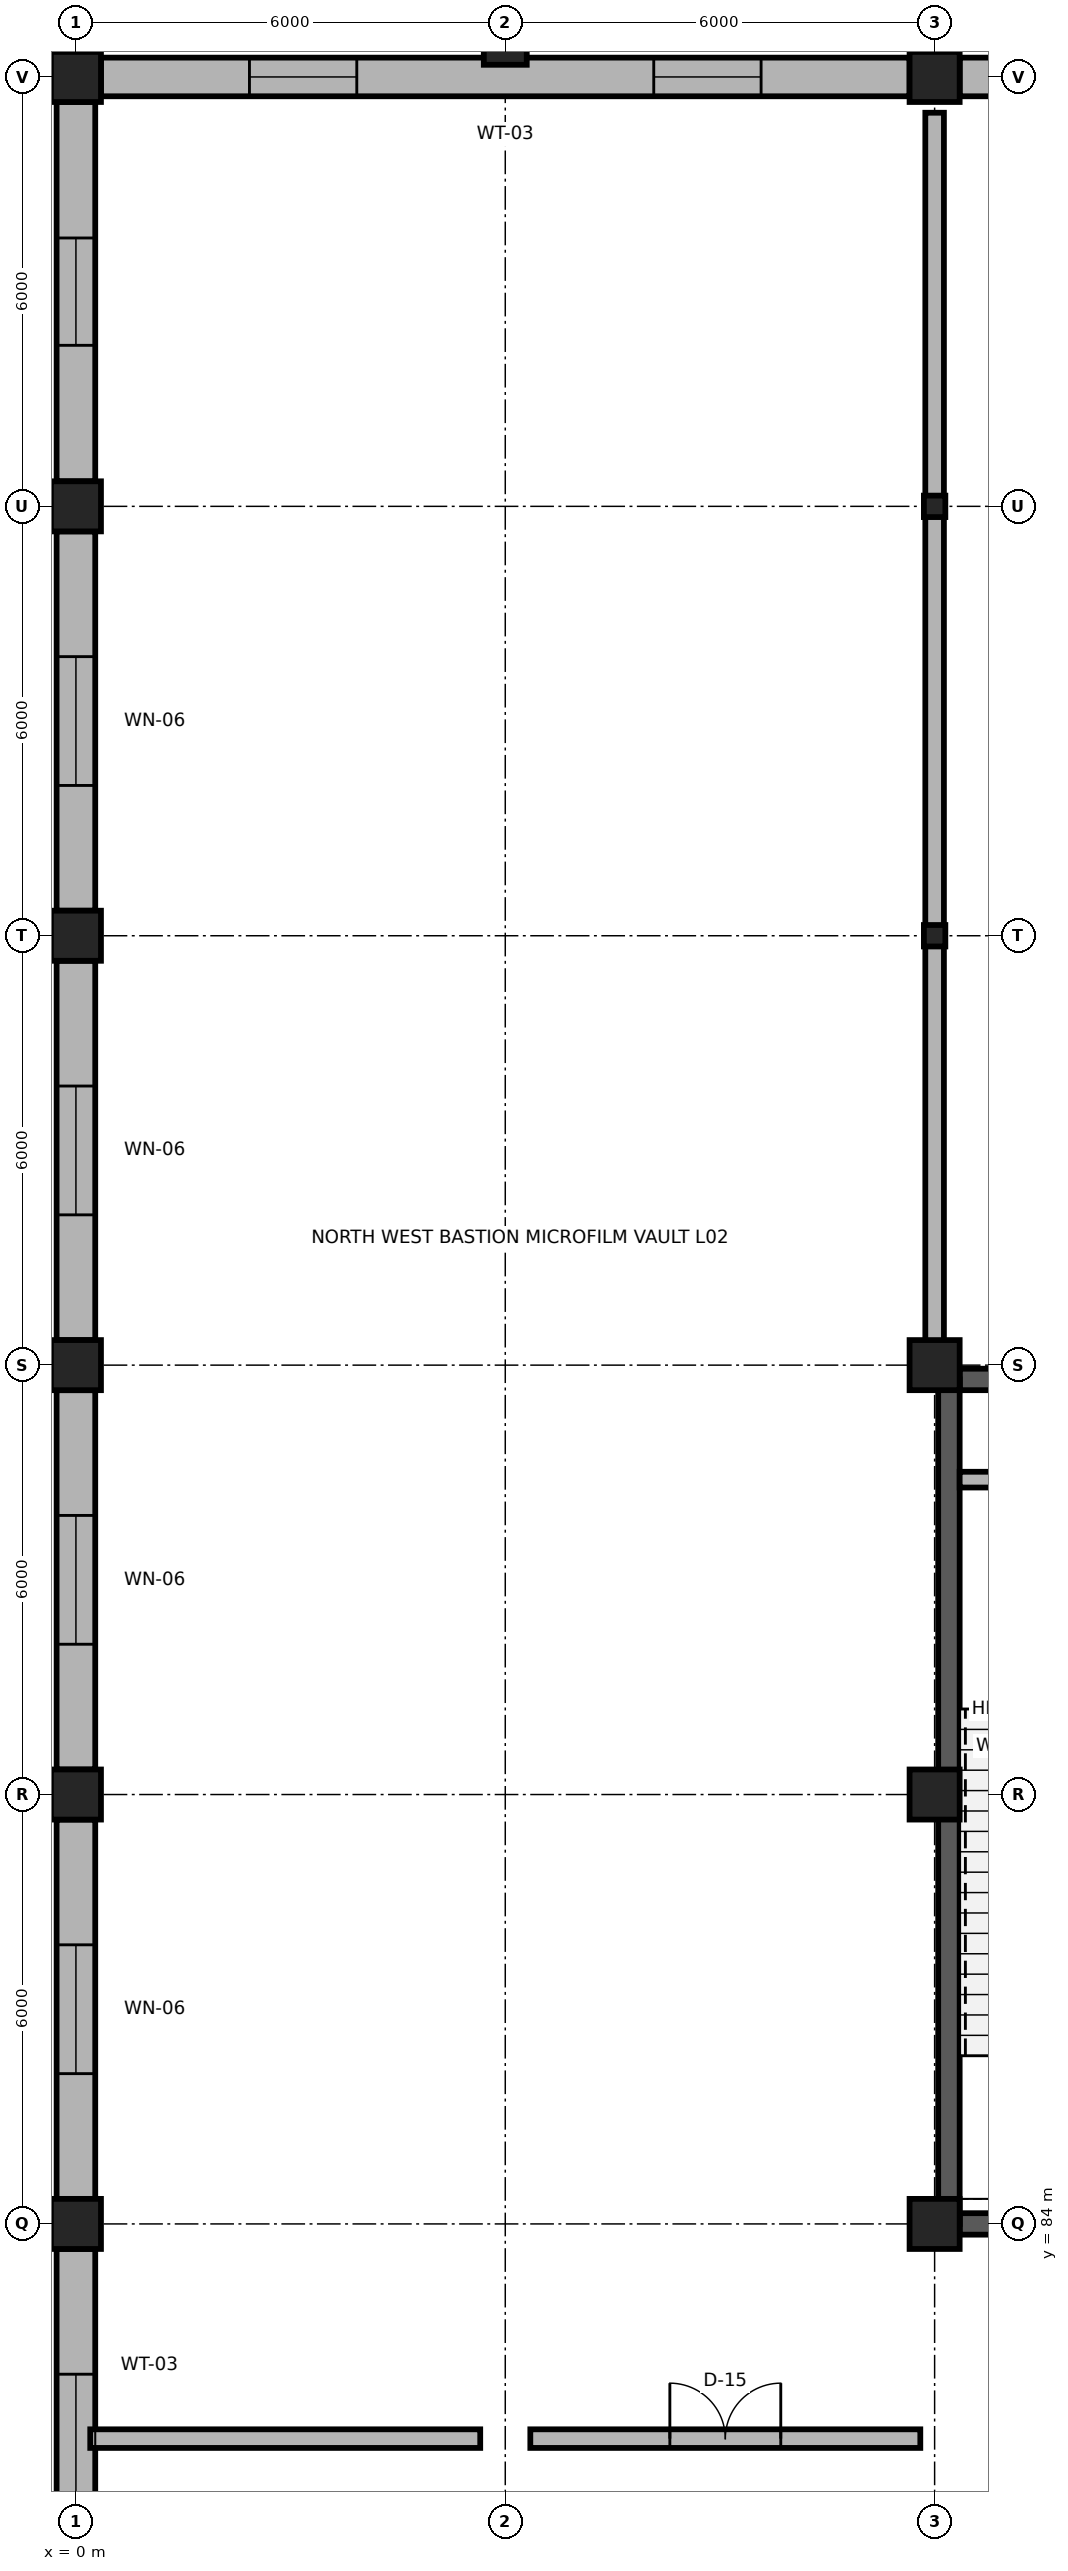
"""IFC4 building model, lengths in metres.
Left out: names, types, materials, properties, quantities, classifications, styles, units other than length and angle.
Written with IfcOpenShell. Run it as: python <this file> out.ifc"""

import sys

from ifc_helpers import new_model, si_unit, direction, frame, frame_2d, origin, origin_2d, place, context, subcontext, project, spatial, rectangle, i_section, extrude, element, fill, save


model = new_model("IFC4")
c1 = context("Model", 3, precision=1e-05, world=origin(), true_north=direction((0.0, 1.0)))
c2 = subcontext(c1, "Body", "Model", "MODEL_VIEW")
j1 = project(units=[si_unit("LENGTHUNIT", "METRE"), si_unit("PLANEANGLEUNIT", "RADIAN")], contexts=[c1])
p1 = place(None, origin())
s1 = spatial("IfcSite", under=j1, at=p1, CompositionType="ELEMENT")
p2 = place(p1, origin())
s2 = spatial("IfcBuilding", under=s1, at=p2, CompositionType="ELEMENT")
p3 = place(p2, frame((0.0, 0.0, 6.0)))
s3 = spatial("IfcBuildingStorey", under=s2, at=p3, CompositionType="ELEMENT", Elevation=6.0)
for number, where, z_axis, x_axis in (
    (1, (0.0, 84.0, 0.0), (0.0, 0.0, 1.0), (1.0, 0.0, 0.0)),
    (2, (12.0, 84.0, 0.0), (0.0, 0.0, 1.0), (1.0, 0.0, 0.0)),
    (3, (0.0, 90.0, 0.0), (0.0, 0.0, 1.0), (1.0, 0.0, 0.0)),
    (4, (12.0, 90.0, 0.0), (0.0, 0.0, 1.0), (1.0, 0.0, 0.0)),
    (5, (0.0, 96.0, 0.0), (0.0, 0.0, 1.0), (1.0, 0.0, 0.0)),
    (6, (12.0, 96.0, 0.0), (0.0, 0.0, 1.0), (1.0, 0.0, 0.0)),
    (7, (0.0, 102.0, 0.0), (0.0, 0.0, 1.0), (1.0, 0.0, 0.0)),
):
    element("IfcColumn", number, at=place(p3, frame(where, z_axis=z_axis, x_axis=x_axis)), inside=s3, PredefinedType="COLUMN", context=c2, shape_type="SweptSolid", body=[
        extrude(rectangle(XDim=0.7, YDim=0.7, at=origin_2d()), origin(), (0.0, 0.0, 1.0), 6.0),
    ])
p4 = place(p3, frame((12.0, 102.0, 0.0), z_axis=(0.0, 0.0, 1.0), x_axis=(1.0, 0.0, 0.0)))
e8 = element("IfcColumn", 8, at=p4, inside=s3, PredefinedType="COLUMN", context=c2, shape_type="SweptSolid", body=[
    extrude(i_section(OverallWidth=0.3, OverallDepth=0.3, WebThickness=0.01, FlangeThickness=0.015, FilletRadius=0.018, at=origin_2d()), origin(), (0.0, 0.0, 1.0), 6.0),
])
p5 = place(p3, frame((0.0, 108.0, 0.0), z_axis=(0.0, 0.0, 1.0), x_axis=(1.0, 0.0, 0.0)))
e9 = element("IfcColumn", 9, at=p5, inside=s3, PredefinedType="COLUMN", context=c2, shape_type="SweptSolid", body=[
    extrude(rectangle(XDim=0.7, YDim=0.7, at=origin_2d()), origin(), (0.0, 0.0, 1.0), 6.0),
])
p6 = place(p3, frame((12.0, 108.0, 0.0), z_axis=(0.0, 0.0, 1.0), x_axis=(1.0, 0.0, 0.0)))
e10 = element("IfcColumn", 10, at=p6, inside=s3, PredefinedType="COLUMN", context=c2, shape_type="SweptSolid", body=[
    extrude(i_section(OverallWidth=0.3, OverallDepth=0.3, WebThickness=0.01, FlangeThickness=0.015, FilletRadius=0.018, at=origin_2d()), origin(), (0.0, 0.0, 1.0), 6.0),
])
for number, where, z_axis, x_axis in (
    (11, (0.0, 114.0, 0.0), (0.0, 0.0, 1.0), (1.0, 0.0, 0.0)),
    (12, (12.0, 114.0, 0.0), (0.0, 0.0, 1.0), (1.0, 0.0, 0.0)),
):
    element("IfcColumn", number, at=place(p3, frame(where, z_axis=z_axis, x_axis=x_axis)), inside=s3, PredefinedType="COLUMN", context=c2, shape_type="SweptSolid", body=[
        extrude(rectangle(XDim=0.7, YDim=0.7, at=origin_2d()), origin(), (0.0, 0.0, 1.0), 6.0),
    ])
p7 = place(p3, frame((6.0, 114.35, 0.0), z_axis=(0.0, 0.0, 1.0), x_axis=(1.0, 0.0, 0.0)))
e13 = element("IfcColumn", 13, at=p7, inside=s3, PredefinedType="PILASTER", context=c2, shape_type="SweptSolid", body=[
    extrude(rectangle(XDim=0.6, YDim=0.36, at=origin_2d()), origin(), (0.0, 0.0, 1.0), 6.0),
])
p8 = place(p3, frame((0.35, 114.0, 0.0), z_axis=(0.0, 0.0, 1.0), x_axis=(1.0, 0.0, 0.0)))
e14 = element("IfcWall", 14, at=p8, inside=s3, PredefinedType="SOLIDWALL", context=c2, shape_type="SweptSolid", body=[
    extrude(rectangle(XDim=11.3, YDim=0.54, at=frame_2d((5.65, 0.0))), origin(), (0.0, 0.0, 1.0), 5.31),
])
p9 = place(p8, frame((2.075, 0.0, 0.85)))
e15 = element("IfcOpeningElement", 15, at=p9, cuts=e14, PredefinedType="OPENING", context=c2, shape_type="SweptSolid", body=[
    extrude(rectangle(XDim=1.5, YDim=2.8, at=frame_2d((0.75, 1.4))), frame((0.0, 0.285, 0.0), z_axis=(0.0, -1.0, 0.0), x_axis=(1.0, 0.0, 0.0)), (0.0, 0.0, 1.0), 0.57),
])
p10 = place(p8, frame((7.725, 0.0, 0.85)))
e16 = element("IfcOpeningElement", 16, at=p10, cuts=e14, PredefinedType="OPENING", context=c2, shape_type="SweptSolid", body=[
    extrude(rectangle(XDim=1.5, YDim=2.8, at=frame_2d((0.75, 1.4))), frame((0.0, 0.285, 0.0), z_axis=(0.0, -1.0, 0.0), x_axis=(1.0, 0.0, 0.0)), (0.0, 0.0, 1.0), 0.57),
])
p11 = place(p3, frame((12.35, 114.0, 0.0), z_axis=(0.0, 0.0, 1.0), x_axis=(1.0, 0.0, 0.0)))
e17 = element("IfcWall", 17, at=p11, inside=s3, PredefinedType="SOLIDWALL", context=c2, shape_type="SweptSolid", body=[
    extrude(rectangle(XDim=5.3, YDim=0.54, at=frame_2d((2.65, 0.0))), origin(), (0.0, 0.0, 1.0), 5.31),
])
p12 = place(p3, frame((0.0, 78.35, 0.0), z_axis=(0.0, 0.0, 1.0), x_axis=(0.0, 1.0, 0.0)))
e18 = element("IfcWall", 18, at=p12, inside=s3, PredefinedType="SOLIDWALL", context=c2, shape_type="SweptSolid", body=[
    extrude(rectangle(XDim=5.3, YDim=0.54, at=frame_2d((2.65, 0.0))), origin(), (0.0, 0.0, 1.0), 5.31),
])
p13 = place(p12, frame((1.75, 0.0, 0.85)))
e19 = element("IfcOpeningElement", 19, at=p13, cuts=e18, PredefinedType="OPENING", context=c2, shape_type="SweptSolid", body=[
    extrude(rectangle(XDim=1.8, YDim=3.3, at=frame_2d((0.9, 1.65))), frame((0.0, 0.285, 0.0), z_axis=(0.0, -1.0, 0.0), x_axis=(1.0, 0.0, 0.0)), (0.0, 0.0, 1.0), 0.57),
])
p14 = place(p3, frame((0.0, 84.35, 0.0), z_axis=(0.0, 0.0, 1.0), x_axis=(0.0, 1.0, 0.0)))
e20 = element("IfcWall", 20, at=p14, inside=s3, PredefinedType="SOLIDWALL", context=c2, shape_type="SweptSolid", body=[
    extrude(rectangle(XDim=5.3, YDim=0.54, at=frame_2d((2.65, 0.0))), origin(), (0.0, 0.0, 1.0), 5.31),
])
p15 = place(p14, frame((1.75, 0.0, 0.85)))
e21 = element("IfcOpeningElement", 21, at=p15, cuts=e20, PredefinedType="OPENING", context=c2, shape_type="SweptSolid", body=[
    extrude(rectangle(XDim=1.8, YDim=3.3, at=frame_2d((0.9, 1.65))), frame((0.0, 0.285, 0.0), z_axis=(0.0, -1.0, 0.0), x_axis=(1.0, 0.0, 0.0)), (0.0, 0.0, 1.0), 0.57),
])
p16 = place(p3, frame((0.0, 90.35, 0.0), z_axis=(0.0, 0.0, 1.0), x_axis=(0.0, 1.0, 0.0)))
e22 = element("IfcWall", 22, at=p16, inside=s3, PredefinedType="SOLIDWALL", context=c2, shape_type="SweptSolid", body=[
    extrude(rectangle(XDim=5.3, YDim=0.54, at=frame_2d((2.65, 0.0))), origin(), (0.0, 0.0, 1.0), 5.31),
])
p17 = place(p16, frame((1.75, 0.0, 0.85)))
e23 = element("IfcOpeningElement", 23, at=p17, cuts=e22, PredefinedType="OPENING", context=c2, shape_type="SweptSolid", body=[
    extrude(rectangle(XDim=1.8, YDim=3.3, at=frame_2d((0.9, 1.65))), frame((0.0, 0.285, 0.0), z_axis=(0.0, -1.0, 0.0), x_axis=(1.0, 0.0, 0.0)), (0.0, 0.0, 1.0), 0.57),
])
p18 = place(p3, frame((0.0, 96.35, 0.0), z_axis=(0.0, 0.0, 1.0), x_axis=(0.0, 1.0, 0.0)))
e24 = element("IfcWall", 24, at=p18, inside=s3, PredefinedType="SOLIDWALL", context=c2, shape_type="SweptSolid", body=[
    extrude(rectangle(XDim=5.3, YDim=0.54, at=frame_2d((2.65, 0.0))), origin(), (0.0, 0.0, 1.0), 5.31),
])
p19 = place(p18, frame((1.75, 0.0, 0.85)))
e25 = element("IfcOpeningElement", 25, at=p19, cuts=e24, PredefinedType="OPENING", context=c2, shape_type="SweptSolid", body=[
    extrude(rectangle(XDim=1.8, YDim=3.3, at=frame_2d((0.9, 1.65))), frame((0.0, 0.285, 0.0), z_axis=(0.0, -1.0, 0.0), x_axis=(1.0, 0.0, 0.0)), (0.0, 0.0, 1.0), 0.57),
])
p20 = place(p3, frame((0.0, 102.35, 0.0), z_axis=(0.0, 0.0, 1.0), x_axis=(0.0, 1.0, 0.0)))
e26 = element("IfcWall", 26, at=p20, inside=s3, PredefinedType="SOLIDWALL", context=c2, shape_type="SweptSolid", body=[
    extrude(rectangle(XDim=5.3, YDim=0.54, at=frame_2d((2.65, 0.0))), origin(), (0.0, 0.0, 1.0), 5.31),
])
p21 = place(p20, frame((1.75, 0.0, 0.85)))
e27 = element("IfcOpeningElement", 27, at=p21, cuts=e26, PredefinedType="OPENING", context=c2, shape_type="SweptSolid", body=[
    extrude(rectangle(XDim=1.8, YDim=3.3, at=frame_2d((0.9, 1.65))), frame((0.0, 0.285, 0.0), z_axis=(0.0, -1.0, 0.0), x_axis=(1.0, 0.0, 0.0)), (0.0, 0.0, 1.0), 0.57),
])
p22 = place(p3, frame((0.0, 108.35, 0.0), z_axis=(0.0, 0.0, 1.0), x_axis=(0.0, 1.0, 0.0)))
e28 = element("IfcWall", 28, at=p22, inside=s3, PredefinedType="SOLIDWALL", context=c2, shape_type="SweptSolid", body=[
    extrude(rectangle(XDim=5.3, YDim=0.54, at=frame_2d((2.65, 0.0))), origin(), (0.0, 0.0, 1.0), 5.31),
])
p23 = place(p22, frame((1.9, 0.0, 0.85)))
e29 = element("IfcOpeningElement", 29, at=p23, cuts=e28, PredefinedType="OPENING", context=c2, shape_type="SweptSolid", body=[
    extrude(rectangle(XDim=1.5, YDim=2.8, at=frame_2d((0.75, 1.4))), frame((0.0, 0.285, 0.0), z_axis=(0.0, -1.0, 0.0), x_axis=(1.0, 0.0, 0.0)), (0.0, 0.0, 1.0), 0.57),
])
p24 = place(p3, frame((12.35, 84.0, 0.0), z_axis=(0.0, 0.0, 1.0), x_axis=(1.0, 0.0, 0.0)))
e30 = element("IfcWall", 30, at=p24, inside=s3, PredefinedType="SHEAR", context=c2, shape_type="SweptSolid", body=[
    extrude(rectangle(XDim=5.3, YDim=0.3, at=frame_2d((2.65, 0.0))), origin(), (0.0, 0.0, 1.0), 5.76),
])
p25 = place(p24, frame((1.925, 0.0, 0.0)))
e31 = element("IfcOpeningElement", 31, at=p25, cuts=e30, PredefinedType="OPENING", context=c2, shape_type="SweptSolid", body=[
    extrude(rectangle(XDim=1.45, YDim=2.25, at=frame_2d((0.725, 1.125))), frame((0.0, 0.165, 0.0), z_axis=(0.0, -1.0, 0.0), x_axis=(1.0, 0.0, 0.0)), (0.0, 0.0, 1.0), 0.33),
])
p26 = place(p3, frame((12.35, 95.8, 0.0), z_axis=(0.0, 0.0, 1.0), x_axis=(1.0, 0.0, 0.0)))
e32 = element("IfcWall", 32, at=p26, inside=s3, PredefinedType="SHEAR", context=c2, shape_type="SweptSolid", body=[
    extrude(rectangle(XDim=5.3, YDim=0.3, at=frame_2d((2.65, 0.0))), origin(), (0.0, 0.0, 1.0), 5.76),
])
p27 = place(p3, frame((12.2, 84.0, 0.0), z_axis=(0.0, 0.0, 1.0), x_axis=(0.0, 1.0, 0.0)))
e33 = element("IfcWall", 33, at=p27, inside=s3, PredefinedType="SHEAR", context=c2, shape_type="SweptSolid", body=[
    extrude(rectangle(XDim=11.8, YDim=0.3, at=frame_2d((5.9, 0.0))), origin(), (0.0, 0.0, 1.0), 5.76),
])
p28 = place(p3, frame((12.35, 94.4, 0.0), z_axis=(0.0, 0.0, 1.0), x_axis=(1.0, 0.0, 0.0)))
e34 = element("IfcWall", 34, at=p28, inside=s3, PredefinedType="PARTITIONING", context=c2, shape_type="SweptSolid", body=[
    extrude(rectangle(XDim=1.1, YDim=0.22, at=frame_2d((0.55, 0.0))), origin(), (0.0, 0.0, 1.0), 5.76),
])
p29 = place(p3, frame((6.35, 81.0, 0.0), z_axis=(0.0, 0.0, 1.0), x_axis=(1.0, 0.0, 0.0)))
e35 = element("IfcWall", 35, at=p29, inside=s3, PredefinedType="PARTITIONING", context=c2, shape_type="SweptSolid", body=[
    extrude(rectangle(XDim=5.45, YDim=0.26, at=frame_2d((2.725, 0.0))), origin(), (0.0, 0.0, 1.0), 5.76),
])
p30 = place(p29, frame((1.95, 0.0, 0.0)))
e36 = element("IfcOpeningElement", 36, at=p30, cuts=e35, PredefinedType="OPENING", context=c2, shape_type="SweptSolid", body=[
    extrude(rectangle(XDim=1.55, YDim=2.3, at=frame_2d((0.775, 1.15))), frame((0.0, 0.145, 0.0), z_axis=(0.0, -1.0, 0.0), x_axis=(1.0, 0.0, 0.0)), (0.0, 0.0, 1.0), 0.29),
])
p31 = place(p3, frame((0.2, 81.0, 0.0), z_axis=(0.0, 0.0, 1.0), x_axis=(1.0, 0.0, 0.0)))
e37 = element("IfcWall", 37, at=p31, inside=s3, PredefinedType="PARTITIONING", context=c2, shape_type="SweptSolid", body=[
    extrude(rectangle(XDim=5.45, YDim=0.26, at=frame_2d((2.725, 0.0))), origin(), (0.0, 0.0, 1.0), 5.76),
])
p32 = place(p3, frame((12.0, 96.2, 0.0), z_axis=(0.0, 0.0, 1.0), x_axis=(0.0, 1.0, 0.0)))
e38 = element("IfcWall", 38, at=p32, inside=s3, PredefinedType="PARTITIONING", context=c2, shape_type="SweptSolid", body=[
    extrude(rectangle(XDim=17.3, YDim=0.26, at=frame_2d((8.65, 0.0))), origin(), (0.0, 0.0, 1.0), 5.32),
])
p33 = place(p9, origin())
e39 = element("IfcWindow", 39, at=p33, inside=s3, PartitioningType="SINGLE_PANEL", PredefinedType="WINDOW", context=c2, shape_type="SweptSolid", body=[
    extrude(rectangle(XDim=1.5, YDim=2.8, at=frame_2d((0.75, 1.4))), frame((0.0, 0.03, 0.0), z_axis=(0.0, -1.0, 0.0), x_axis=(1.0, 0.0, 0.0)), (0.0, 0.0, 1.0), 0.06),
])
fill(e15, e39)
p34 = place(p10, origin())
e40 = element("IfcWindow", 40, at=p34, inside=s3, PartitioningType="SINGLE_PANEL", PredefinedType="WINDOW", context=c2, shape_type="SweptSolid", body=[
    extrude(rectangle(XDim=1.5, YDim=2.8, at=frame_2d((0.75, 1.4))), frame((0.0, 0.03, 0.0), z_axis=(0.0, -1.0, 0.0), x_axis=(1.0, 0.0, 0.0)), (0.0, 0.0, 1.0), 0.06),
])
fill(e16, e40)
p35 = place(p13, origin())
e41 = element("IfcWindow", 41, at=p35, inside=s3, PartitioningType="SINGLE_PANEL", PredefinedType="WINDOW", context=c2, shape_type="SweptSolid", body=[
    extrude(rectangle(XDim=1.8, YDim=3.3, at=frame_2d((0.9, 1.65))), frame((0.0, 0.03, 0.0), z_axis=(0.0, -1.0, 0.0), x_axis=(1.0, 0.0, 0.0)), (0.0, 0.0, 1.0), 0.06),
])
fill(e19, e41)
p36 = place(p15, origin())
e42 = element("IfcWindow", 42, at=p36, inside=s3, PartitioningType="SINGLE_PANEL", PredefinedType="WINDOW", context=c2, shape_type="SweptSolid", body=[
    extrude(rectangle(XDim=1.8, YDim=3.3, at=frame_2d((0.9, 1.65))), frame((0.0, 0.03, 0.0), z_axis=(0.0, -1.0, 0.0), x_axis=(1.0, 0.0, 0.0)), (0.0, 0.0, 1.0), 0.06),
])
fill(e21, e42)
p37 = place(p17, origin())
e43 = element("IfcWindow", 43, at=p37, inside=s3, PartitioningType="SINGLE_PANEL", PredefinedType="WINDOW", context=c2, shape_type="SweptSolid", body=[
    extrude(rectangle(XDim=1.8, YDim=3.3, at=frame_2d((0.9, 1.65))), frame((0.0, 0.03, 0.0), z_axis=(0.0, -1.0, 0.0), x_axis=(1.0, 0.0, 0.0)), (0.0, 0.0, 1.0), 0.06),
])
fill(e23, e43)
p38 = place(p19, origin())
e44 = element("IfcWindow", 44, at=p38, inside=s3, PartitioningType="SINGLE_PANEL", PredefinedType="WINDOW", context=c2, shape_type="SweptSolid", body=[
    extrude(rectangle(XDim=1.8, YDim=3.3, at=frame_2d((0.9, 1.65))), frame((0.0, 0.03, 0.0), z_axis=(0.0, -1.0, 0.0), x_axis=(1.0, 0.0, 0.0)), (0.0, 0.0, 1.0), 0.06),
])
fill(e25, e44)
p39 = place(p21, origin())
e45 = element("IfcWindow", 45, at=p39, inside=s3, PartitioningType="SINGLE_PANEL", PredefinedType="WINDOW", context=c2, shape_type="SweptSolid", body=[
    extrude(rectangle(XDim=1.8, YDim=3.3, at=frame_2d((0.9, 1.65))), frame((0.0, 0.03, 0.0), z_axis=(0.0, -1.0, 0.0), x_axis=(1.0, 0.0, 0.0)), (0.0, 0.0, 1.0), 0.06),
])
fill(e27, e45)
p40 = place(p23, origin())
e46 = element("IfcWindow", 46, at=p40, inside=s3, PartitioningType="SINGLE_PANEL", PredefinedType="WINDOW", context=c2, shape_type="SweptSolid", body=[
    extrude(rectangle(XDim=1.5, YDim=2.8, at=frame_2d((0.75, 1.4))), frame((0.0, 0.03, 0.0), z_axis=(0.0, -1.0, 0.0), x_axis=(1.0, 0.0, 0.0)), (0.0, 0.0, 1.0), 0.06),
])
fill(e29, e46)
p41 = place(p30, origin())
e47 = element("IfcDoor", 47, at=p41, inside=s3, OperationType="DOUBLE_DOOR_SINGLE_SWING", PredefinedType="DOOR", context=c2, shape_type="SweptSolid", body=[
    extrude(rectangle(XDim=1.55, YDim=2.3, at=frame_2d((0.775, 1.15))), frame((0.0, 0.025, 0.0), z_axis=(0.0, -1.0, 0.0), x_axis=(1.0, 0.0, 0.0)), (0.0, 0.0, 1.0), 0.05),
])
fill(e36, e47)
save(model, sys.argv[1])
